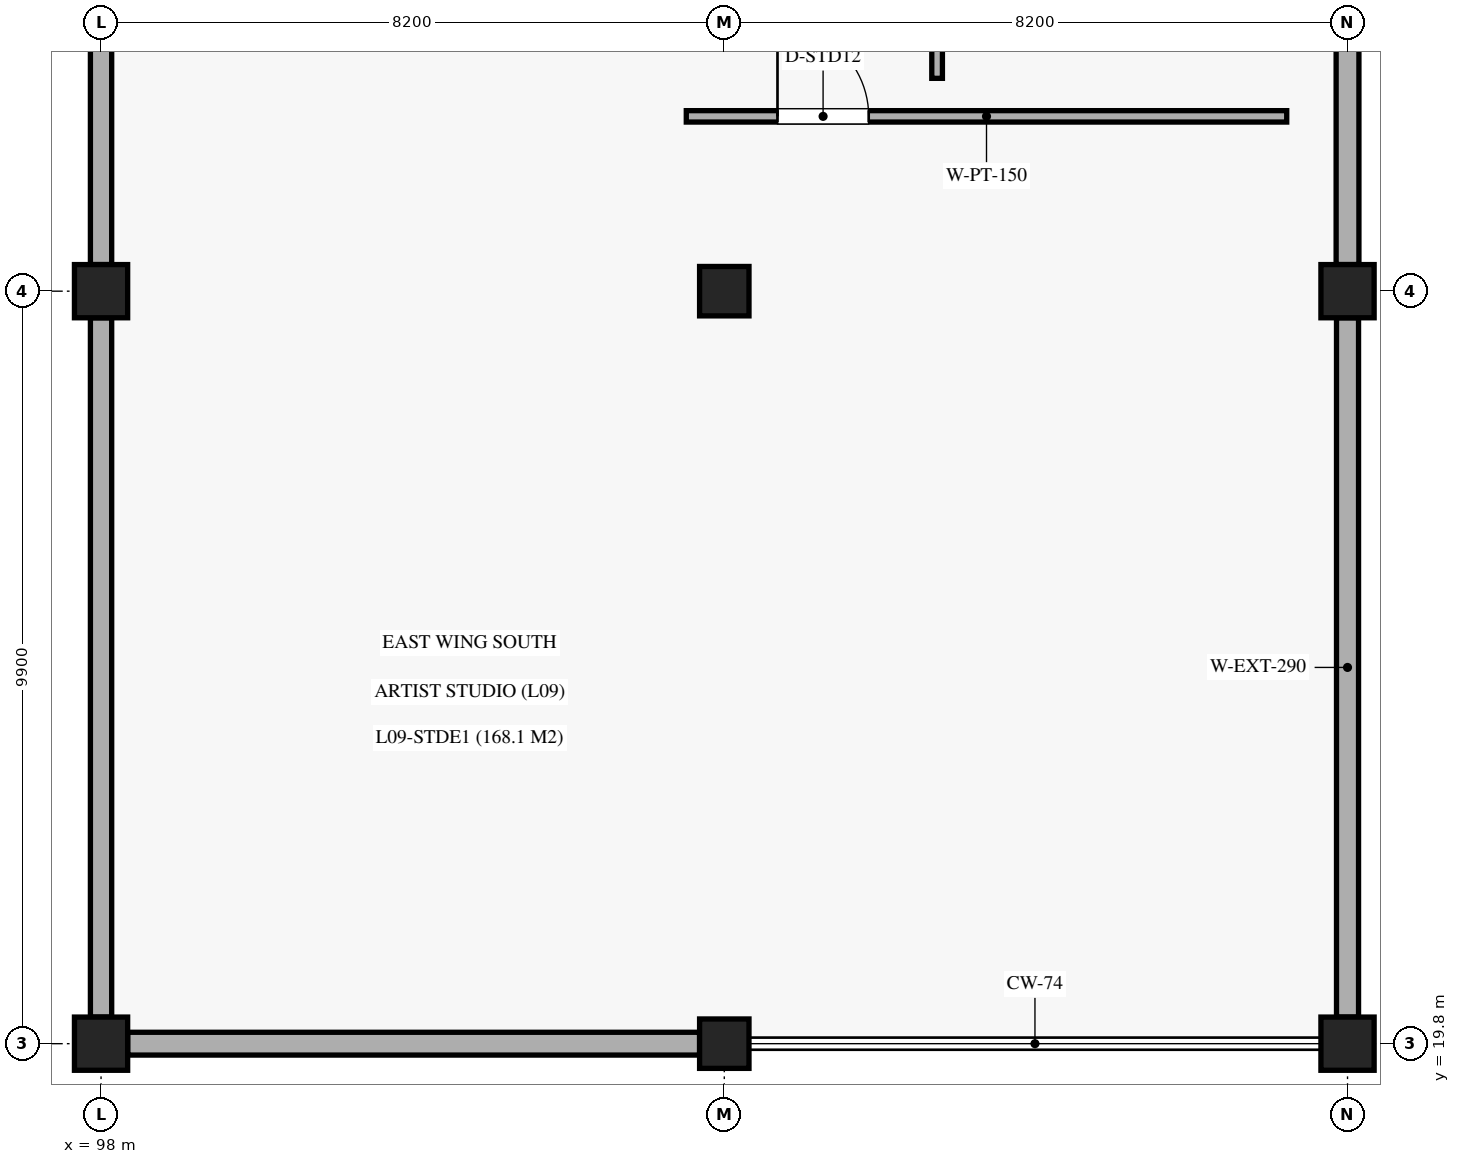
"""IFC4 building model, lengths in metres.
Left out: names, types, materials, properties, quantities, classifications, styles, units other than length and angle.
Written with IfcOpenShell. Run it as: python <this file> out.ifc"""

import sys

from ifc_helpers import new_model, si_unit, direction, frame, frame_2d, origin, origin_2d, place, context, subcontext, project, spatial, rectangle, extrude, element, fill, save


model = new_model("IFC4")
c1 = context("Model", 3, precision=1e-05, world=origin(), true_north=direction((0.0, 1.0)))
c2 = subcontext(c1, "Body", "Model", "MODEL_VIEW")
j1 = project(units=[si_unit("LENGTHUNIT", "METRE"), si_unit("PLANEANGLEUNIT", "RADIAN")], contexts=[c1])
p1 = place(None, origin())
s1 = spatial("IfcSite", under=j1, at=p1, CompositionType="ELEMENT")
p2 = place(p1, origin())
s2 = spatial("IfcBuilding", under=s1, at=p2, CompositionType="ELEMENT")
p3 = place(p2, frame((0.0, 0.0, 46.92)))
s3 = spatial("IfcBuildingStorey", under=s2, at=p3, CompositionType="ELEMENT", Elevation=46.92)
for number, where, z_axis, x_axis in (
    (1, (98.0, 19.8, 0.0), (0.0, 0.0, 1.0), (1.0, 0.0, 0.0)),
    (2, (98.0, 29.7, 0.0), (0.0, 0.0, 1.0), (1.0, 0.0, 0.0)),
):
    element("IfcColumn", number, at=place(p3, frame(where, z_axis=z_axis, x_axis=x_axis)), inside=s3, PredefinedType="COLUMN", context=c2, shape_type="SweptSolid", body=[
        extrude(rectangle(XDim=0.7, YDim=0.7, at=origin_2d()), origin(), (0.0, 0.0, 1.0), 5.1),
    ])
for number, where, z_axis, x_axis in (
    (3, (106.2, 19.8, 0.0), (0.0, 0.0, 1.0), (1.0, 0.0, 0.0)),
    (4, (106.2, 29.7, 0.0), (0.0, 0.0, 1.0), (1.0, 0.0, 0.0)),
):
    element("IfcColumn", number, at=place(p3, frame(where, z_axis=z_axis, x_axis=x_axis)), inside=s3, PredefinedType="COLUMN", context=c2, shape_type="SweptSolid", body=[
        extrude(rectangle(XDim=0.65, YDim=0.65, at=origin_2d()), origin(), (0.0, 0.0, 1.0), 5.1),
    ])
for number, where, z_axis, x_axis in (
    (5, (114.4, 19.8, 0.0), (0.0, 0.0, 1.0), (1.0, 0.0, 0.0)),
    (6, (114.4, 29.7, 0.0), (0.0, 0.0, 1.0), (1.0, 0.0, 0.0)),
):
    element("IfcColumn", number, at=place(p3, frame(where, z_axis=z_axis, x_axis=x_axis)), inside=s3, PredefinedType="COLUMN", context=c2, shape_type="SweptSolid", body=[
        extrude(rectangle(XDim=0.7, YDim=0.7, at=origin_2d()), origin(), (0.0, 0.0, 1.0), 5.1),
    ])
p4 = place(p3, frame((98.0, 20.15, 0.0), z_axis=(0.0, 0.0, 1.0), x_axis=(0.0, 1.0, 0.0)))
e7 = element("IfcWall", 7, at=p4, inside=s3, PredefinedType="SOLIDWALL", context=c2, shape_type="SweptSolid", body=[
    extrude(rectangle(XDim=9.2, YDim=0.28, at=frame_2d((4.6, 0.0))), origin(), (0.0, 0.0, 1.0), 4.1),
])
p5 = place(p3, frame((114.4, 20.15, 0.0), z_axis=(0.0, 0.0, 1.0), x_axis=(0.0, 1.0, 0.0)))
e8 = element("IfcWall", 8, at=p5, inside=s3, PredefinedType="SOLIDWALL", context=c2, shape_type="SweptSolid", body=[
    extrude(rectangle(XDim=9.2, YDim=0.29, at=frame_2d((4.6, 0.0))), origin(), (0.0, 0.0, 1.0), 4.1),
])
p6 = place(p3, frame((98.0, 30.05, 0.0), z_axis=(0.0, 0.0, 1.0), x_axis=(0.0, 1.0, 0.0)))
e9 = element("IfcWall", 9, at=p6, inside=s3, PredefinedType="SOLIDWALL", context=c2, shape_type="SweptSolid", body=[
    extrude(rectangle(XDim=9.2, YDim=0.28, at=frame_2d((4.6, 0.0))), origin(), (0.0, 0.0, 1.0), 4.1),
])
p7 = place(p6, frame((3.6, 0.0, 1.45)))
e10 = element("IfcOpeningElement", 10, at=p7, cuts=e9, PredefinedType="OPENING", context=c2, shape_type="SweptSolid", body=[
    extrude(rectangle(XDim=3.0, YDim=1.95, at=frame_2d((1.5, 0.975))), frame((0.0, 0.15, 0.0), z_axis=(0.0, -1.0, 0.0), x_axis=(1.0, 0.0, 0.0)), (0.0, 0.0, 1.0), 0.3),
])
p8 = place(p3, frame((114.4, 30.05, 0.0), z_axis=(0.0, 0.0, 1.0), x_axis=(0.0, 1.0, 0.0)))
e11 = element("IfcWall", 11, at=p8, inside=s3, PredefinedType="SOLIDWALL", context=c2, shape_type="SweptSolid", body=[
    extrude(rectangle(XDim=9.2, YDim=0.3, at=frame_2d((4.6, 0.0))), origin(), (0.0, 0.0, 1.0), 4.1),
])
p9 = place(p8, frame((3.45, 0.0, 1.65)))
e12 = element("IfcOpeningElement", 12, at=p9, cuts=e11, PredefinedType="OPENING", context=c2, shape_type="SweptSolid", body=[
    extrude(rectangle(XDim=2.3, YDim=1.55, at=frame_2d((1.15, 0.775))), frame((0.0, 0.16, 0.0), z_axis=(0.0, -1.0, 0.0), x_axis=(1.0, 0.0, 0.0)), (0.0, 0.0, 1.0), 0.32),
])
p10 = place(p3, frame((98.35, 19.8, 0.0), z_axis=(0.0, 0.0, 1.0), x_axis=(1.0, 0.0, 0.0)))
e13 = element("IfcWall", 13, at=p10, inside=s3, PredefinedType="SOLIDWALL", context=c2, shape_type="SweptSolid", body=[
    extrude(rectangle(XDim=7.525, YDim=0.3, at=frame_2d((3.762, 0.0))), origin(), (0.0, 0.0, 1.0), 4.1),
])
p11 = place(p3, frame((105.7, 32.0, 0.0), z_axis=(0.0, 0.0, 1.0), x_axis=(1.0, 0.0, 0.0)))
e14 = element("IfcWall", 14, at=p11, inside=s3, PredefinedType="PARTITIONING", context=c2, shape_type="SweptSolid", body=[
    extrude(rectangle(XDim=7.9, YDim=0.15, at=frame_2d((3.95, 0.0))), origin(), (0.0, 0.0, 1.0), 3.97),
])
p12 = place(p11, frame((1.2, 0.0, 0.0)))
e15 = element("IfcOpeningElement", 15, at=p12, cuts=e14, PredefinedType="OPENING", context=c2, shape_type="SweptSolid", body=[
    extrude(rectangle(XDim=1.2, YDim=2.25, at=frame_2d((0.6, 1.125))), frame((0.0, 0.085, 0.0), z_axis=(0.0, -1.0, 0.0), x_axis=(1.0, 0.0, 0.0)), (0.0, 0.0, 1.0), 0.17),
])
p13 = place(p3, frame((109.0, 32.5, 0.0), z_axis=(0.0, 0.0, 1.0), x_axis=(0.0, 1.0, 0.0)))
e16 = element("IfcWall", 16, at=p13, inside=s3, PredefinedType="PARTITIONING", context=c2, shape_type="SweptSolid", body=[
    extrude(rectangle(XDim=33.0, YDim=0.14, at=frame_2d((16.5, 0.0))), origin(), (0.0, 0.0, 1.0), 3.97),
])
p14 = place(p13, frame((8.0, 0.0, 0.0)))
e17 = element("IfcOpeningElement", 17, at=p14, cuts=e16, PredefinedType="OPENING", context=c2, shape_type="SweptSolid", body=[
    extrude(rectangle(XDim=1.2, YDim=2.25, at=frame_2d((0.6, 1.125))), frame((0.0, 0.08, 0.0), z_axis=(0.0, -1.0, 0.0), x_axis=(1.0, 0.0, 0.0)), (0.0, 0.0, 1.0), 0.16),
])
p15 = place(p12, origin())
e18 = element("IfcDoor", 18, at=p15, inside=s3, OperationType="SINGLE_SWING_LEFT", PredefinedType="DOOR", context=c2, shape_type="SweptSolid", body=[
    extrude(rectangle(XDim=1.2, YDim=2.25, at=frame_2d((0.6, 1.125))), frame((0.0, 0.025, 0.0), z_axis=(0.0, -1.0, 0.0), x_axis=(1.0, 0.0, 0.0)), (0.0, 0.0, 1.0), 0.05),
])
fill(e15, e18)
save(model, sys.argv[1])
